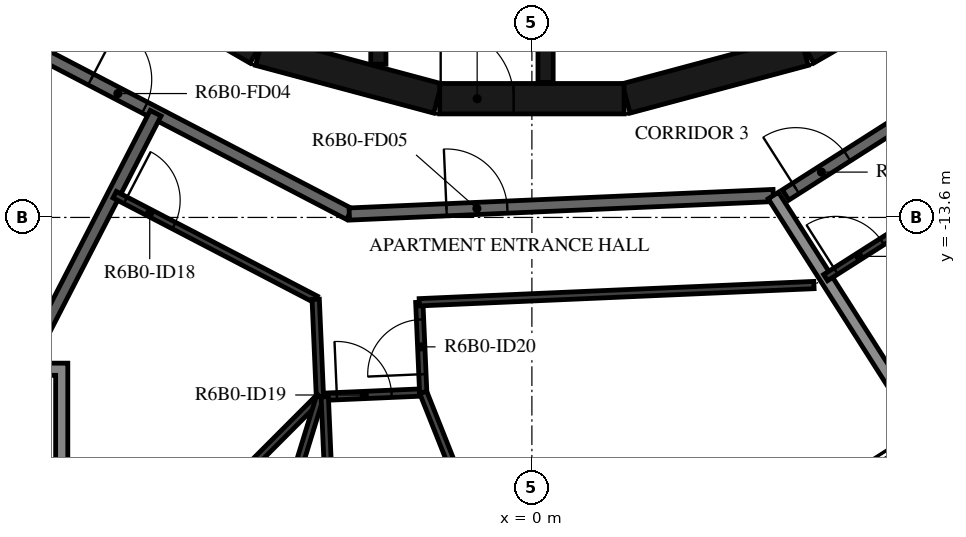
"""IFC4 building model, lengths in metres.
Left out: names, types, materials, properties, quantities, classifications, styles, units other than length and angle.
Written with IfcOpenShell. Run it as: python <this file> out.ifc"""

import sys

from ifc_helpers import new_model, si_unit, direction, frame, frame_2d, origin, place, context, subcontext, project, spatial, polyline, rectangle, outline, extrude, element, fill, save


model = new_model("IFC4")
c1 = context("Model", 3, precision=1e-05, world=origin(), true_north=direction((0.0, 1.0)))
c2 = subcontext(c1, "Body", "Model", "MODEL_VIEW")
j1 = project(units=[si_unit("LENGTHUNIT", "METRE"), si_unit("PLANEANGLEUNIT", "RADIAN")], contexts=[c1])
p1 = place(None, origin())
s1 = spatial("IfcSite", under=j1, at=p1, CompositionType="ELEMENT")
p2 = place(p1, origin())
s2 = spatial("IfcBuilding", under=s1, at=p2, CompositionType="ELEMENT")
p3 = place(p2, frame((0.0, 0.0, 240.7)))
s3 = spatial("IfcBuildingStorey", under=s2, at=p3, CompositionType="ELEMENT", Elevation=240.7)
p4 = place(p3, frame((1.55, -11.643, 0.0), z_axis=(0.0, 0.0, 1.0), x_axis=(0.965948410781, 0.258734743916, 0.0)))
e1 = element("IfcWall", 1, at=p4, inside=s3, PredefinedType="SHEAR", context=c2, shape_type="SweptSolid", body=[
    extrude(rectangle(XDim=3.033, YDim=0.5, at=frame_2d((1.516, 0.0))), origin(), (0.0, 0.0, 1.0), 3.12),
])
p5 = place(p3, frame((4.51, -10.845, 0.0), z_axis=(0.0, 0.0, 1.0), x_axis=(0.865975092491, 0.500087131594, 0.0)))
e2 = element("IfcWall", 2, at=p5, inside=s3, PredefinedType="SHEAR", context=c2, shape_type="SweptSolid", body=[
    extrude(rectangle(XDim=3.033, YDim=0.5, at=frame_2d((1.516, 0.0))), origin(), (0.0, 0.0, 1.0), 3.12),
])
p6 = place(p5, frame((1.066, 0.0, 0.0)))
e3 = element("IfcOpeningElement", 3, at=p6, cuts=e2, PredefinedType="OPENING", context=c2, shape_type="SweptSolid", body=[
    extrude(rectangle(XDim=0.9, YDim=2.1, at=frame_2d((0.45, 1.05))), frame((0.0, 0.26, 0.0), z_axis=(0.0, -1.0, 0.0), x_axis=(1.0, 0.0, 0.0)), (0.0, 0.0, 1.0), 0.52),
])
for number, where, z_axis, x_axis in (
    (4, (-7.137, -9.329, 0.0), (0.0, 0.0, 1.0), (0.866, -0.5, 0.0)),
    (5, (-4.479, -10.858, 0.0), (0.0, 0.0, 1.0), (0.966, -0.259, 0.0)),
):
    element("IfcWall", number, at=place(p3, frame(where, z_axis=z_axis, x_axis=x_axis)), inside=s3, PredefinedType="SHEAR", context=c2, shape_type="SweptSolid", body=[
        extrude(rectangle(XDim=3.033, YDim=0.5, at=frame_2d((1.516, 0.0))), origin(), (0.0, 0.0, 1.0), 3.12),
    ])
p7 = place(p3, frame((-1.516, -11.647, 0.0), z_axis=(0.0, 0.0, 1.0), x_axis=(1.0, 0.0, 0.0)))
e6 = element("IfcWall", 6, at=p7, inside=s3, PredefinedType="SHEAR", context=c2, shape_type="SweptSolid", body=[
    extrude(rectangle(XDim=3.033, YDim=0.5, at=frame_2d((1.516, 0.0))), origin(), (0.0, 0.0, 1.0), 3.12),
])
p8 = place(p7, frame((0.016, 0.0, 0.0)))
e7 = element("IfcOpeningElement", 7, at=p8, cuts=e6, PredefinedType="OPENING", context=c2, shape_type="SweptSolid", body=[
    extrude(rectangle(XDim=1.2, YDim=2.1, at=frame_2d((0.6, 1.05))), frame((0.0, 0.26, 0.0), z_axis=(0.0, -1.0, 0.0), x_axis=(1.0, 0.0, 0.0)), (0.0, 0.0, 1.0), 0.52),
])
p9 = place(p3, frame((-2.525, -8.97, 0.0), z_axis=(0.0, 0.0, 1.0), x_axis=(0.0, -1.0, 0.0)))
e8 = element("IfcWall", 8, at=p9, inside=s3, PredefinedType="SHEAR", context=c2, shape_type="SweptSolid", body=[
    extrude(rectangle(XDim=2.11, YDim=0.25, at=frame_2d((1.055, 0.0))), origin(), (0.0, 0.0, 1.0), 3.12),
])
p10 = place(p3, frame((0.225, -8.97, 0.0), z_axis=(0.0, 0.0, 1.0), x_axis=(0.0, -1.0, 0.0)))
e9 = element("IfcWall", 9, at=p10, inside=s3, PredefinedType="SHEAR", context=c2, shape_type="SweptSolid", body=[
    extrude(rectangle(XDim=2.41, YDim=0.25, at=frame_2d((1.205, 0.0))), origin(), (0.0, 0.0, 1.0), 3.12),
])
p11 = place(p3, frame((-9.372, -10.228, 0.0), z_axis=(0.0, 0.0, 1.0), x_axis=(0.887005184532, -0.461759464021, 0.0)))
e10 = element("IfcWall", 10, at=p11, inside=s3, PredefinedType="STANDARD", context=c2, shape_type="SweptSolid", body=[
    extrude(rectangle(XDim=7.181, YDim=0.2, at=frame_2d((3.591, 0.0))), origin(), (0.0, 0.0, 1.0), 3.12),
])
p12 = place(p11, frame((2.391, 0.0, 0.0)))
e11 = element("IfcOpeningElement", 11, at=p12, cuts=e10, PredefinedType="OPENING", context=c2, shape_type="SweptSolid", body=[
    extrude(rectangle(XDim=1.0, YDim=2.1, at=frame_2d((0.5, 1.05))), frame((0.0, 0.11, 0.0), z_axis=(0.0, -1.0, 0.0), x_axis=(1.0, 0.0, 0.0)), (0.0, 0.0, 1.0), 0.22),
])
p13 = place(p3, frame((-3.003, -13.544, 0.0), z_axis=(0.0, 0.0, 1.0), x_axis=(0.999048221872, 0.043619380718, 0.0)))
e12 = element("IfcWall", 12, at=p13, inside=s3, PredefinedType="STANDARD", context=c2, shape_type="SweptSolid", body=[
    extrude(rectangle(XDim=6.979, YDim=0.2, at=frame_2d((3.49, 0.0))), origin(), (0.0, 0.0, 1.0), 3.12),
])
p14 = place(p13, frame((1.6, 0.0, 0.0)))
e13 = element("IfcOpeningElement", 13, at=p14, cuts=e12, PredefinedType="OPENING", context=c2, shape_type="SweptSolid", body=[
    extrude(rectangle(XDim=1.0, YDim=2.1, at=frame_2d((0.5, 1.05))), frame((0.0, 0.11, 0.0), z_axis=(0.0, -1.0, 0.0), x_axis=(1.0, 0.0, 0.0)), (0.0, 0.0, 1.0), 0.22),
])
p15 = place(p3, frame((4.172, -13.231, 0.0), z_axis=(0.0, 0.0, 1.0), x_axis=(0.843388394728, 0.537304397561, 0.0)))
e14 = element("IfcWall", 14, at=p15, inside=s3, PredefinedType="STANDARD", context=c2, shape_type="SweptSolid", body=[
    extrude(rectangle(XDim=7.181, YDim=0.2, at=frame_2d((3.59, 0.0))), origin(), (0.0, 0.0, 1.0), 3.12),
])
p16 = place(p15, frame((0.2, 0.0, 0.0)))
e15 = element("IfcOpeningElement", 15, at=p16, cuts=e14, PredefinedType="OPENING", context=c2, shape_type="SweptSolid", body=[
    extrude(rectangle(XDim=1.0, YDim=2.1, at=frame_2d((0.5, 1.05))), frame((0.0, 0.11, 0.0), z_axis=(0.0, -1.0, 0.0), x_axis=(1.0, 0.0, 0.0)), (0.0, 0.0, 1.0), 0.22),
])
p17 = place(p3, frame((-8.303, -15.996, 0.0), z_axis=(0.0, 0.0, 1.0), x_axis=(0.457702371186, 0.889105471477, 0.0)))
e16 = element("IfcWall", 16, at=p17, inside=s3, PredefinedType="STANDARD", context=c2, shape_type="SweptSolid", body=[
    extrude(rectangle(XDim=4.623, YDim=0.2, at=frame_2d((2.312, 0.0))), origin(), (0.0, 0.0, 1.0), 3.12),
])
p18 = place(p3, frame((6.407, -17.064, 0.0), z_axis=(0.0, 0.0, 1.0), x_axis=(-0.537324777979, 0.843375410461, 0.0)))
e17 = element("IfcWall", 17, at=p18, inside=s3, PredefinedType="STANDARD", context=c2, shape_type="SweptSolid", body=[
    extrude(rectangle(XDim=4.535, YDim=0.2, at=frame_2d((2.268, 0.0))), origin(), (0.0, 0.0, 1.0), 2.73),
])
p19 = place(p3, frame((-6.861, -13.226, 0.0), z_axis=(0.0, 0.0, 1.0), x_axis=(0.887010791097, -0.461748694073, 0.0)))
e18 = element("IfcWall", 18, at=p19, inside=s3, PredefinedType="PARTITIONING", context=c2, shape_type="SweptSolid", body=[
    extrude(rectangle(XDim=3.727, YDim=0.12, at=frame_2d((1.864, 0.0))), origin(), (0.0, 0.0, 1.0), 3.12),
])
p20 = place(p19, frame((0.2, 0.0, 0.0)))
e19 = element("IfcOpeningElement", 19, at=p20, cuts=e18, PredefinedType="OPENING", context=c2, shape_type="SweptSolid", body=[
    extrude(rectangle(XDim=0.9, YDim=2.1, at=frame_2d((0.45, 1.05))), frame((0.0, 0.07, 0.0), z_axis=(0.0, -1.0, 0.0), x_axis=(1.0, 0.0, 0.0)), (0.0, 0.0, 1.0), 0.14),
])
p21 = place(p3, frame((-3.555, -14.947, 0.0), z_axis=(0.0, 0.0, 1.0), x_axis=(0.043470204022, -0.999054723908, 0.0)))
e20 = element("IfcWall", 20, at=p21, inside=s3, PredefinedType="PARTITIONING", context=c2, shape_type="SweptSolid", body=[
    extrude(rectangle(XDim=1.606, YDim=0.12, at=frame_2d((0.803, 0.0))), origin(), (0.0, 0.0, 1.0), 3.12),
])
p22 = place(p3, frame((-3.407, -16.548, 0.0), z_axis=(0.0, 0.0, 1.0), x_axis=(0.999045901572, 0.043672491929, 0.0)))
e21 = element("IfcWall", 21, at=p22, inside=s3, PredefinedType="PARTITIONING", context=c2, shape_type="SweptSolid", body=[
    extrude(rectangle(XDim=1.621, YDim=0.12, at=frame_2d((0.811, 0.0))), origin(), (0.0, 0.0, 1.0), 3.12),
])
p23 = place(p22, frame((0.2, 0.0, 0.0)))
e22 = element("IfcOpeningElement", 22, at=p23, cuts=e21, PredefinedType="OPENING", context=c2, shape_type="SweptSolid", body=[
    extrude(rectangle(XDim=0.9, YDim=2.1, at=frame_2d((0.45, 1.05))), frame((0.0, 0.07, 0.0), z_axis=(0.0, -1.0, 0.0), x_axis=(1.0, 0.0, 0.0)), (0.0, 0.0, 1.0), 0.14),
])
p24 = place(p3, frame((-1.787, -16.478, 0.0), z_axis=(0.0, 0.0, 1.0), x_axis=(-0.043601447011, 0.999049004713, 0.0)))
e23 = element("IfcWall", 23, at=p24, inside=s3, PredefinedType="PARTITIONING", context=c2, shape_type="SweptSolid", body=[
    extrude(rectangle(XDim=1.484, YDim=0.12, at=frame_2d((0.742, 0.0))), origin(), (0.0, 0.0, 1.0), 3.12),
])
p25 = place(p24, frame((0.3, 0.0, 0.0)))
e24 = element("IfcOpeningElement", 24, at=p25, cuts=e23, PredefinedType="OPENING", context=c2, shape_type="SweptSolid", body=[
    extrude(rectangle(XDim=0.9, YDim=2.1, at=frame_2d((0.45, 1.05))), frame((0.0, 0.07, 0.0), z_axis=(0.0, -1.0, 0.0), x_axis=(1.0, 0.0, 0.0)), (0.0, 0.0, 1.0), 0.14),
])
p26 = place(p3, frame((-1.852, -14.995, 0.0), z_axis=(0.0, 0.0, 1.0), x_axis=(0.999047773092, 0.043629658249, 0.0)))
e25 = element("IfcWall", 25, at=p26, inside=s3, PredefinedType="PARTITIONING", context=c2, shape_type="SweptSolid", body=[
    extrude(rectangle(XDim=6.497, YDim=0.12, at=frame_2d((3.248, 0.0))), origin(), (0.0, 0.0, 1.0), 3.12),
])
p27 = place(p3, frame((-11.862, -24.94, 0.0), z_axis=(0.0, 0.0, 1.0), x_axis=(0.70663293894, 0.707580306117, 0.0)))
e26 = element("IfcWall", 26, at=p27, inside=s3, PredefinedType="PARTITIONING", context=c2, shape_type="SweptSolid", body=[
    extrude(rectangle(XDim=11.854, YDim=0.12, at=frame_2d((5.927, 0.0))), origin(), (0.0, 0.0, 1.0), 3.12),
])
p28 = place(p27, frame((1.9, 0.0, 0.0)))
e27 = element("IfcOpeningElement", 27, at=p28, cuts=e26, PredefinedType="OPENING", context=c2, shape_type="SweptSolid", body=[
    extrude(rectangle(XDim=0.9, YDim=2.1, at=frame_2d((0.45, 1.05))), frame((0.0, 0.07, 0.0), z_axis=(0.0, -1.0, 0.0), x_axis=(1.0, 0.0, 0.0)), (0.0, 0.0, 1.0), 0.14),
])
p29 = place(p3, frame((-6.026, -24.795, 0.0), z_axis=(0.0, 0.0, 1.0), x_axis=(0.294501505058, 0.955651015548, 0.0)))
e28 = element("IfcWall", 28, at=p29, inside=s3, PredefinedType="PARTITIONING", context=c2, shape_type="SweptSolid", body=[
    extrude(rectangle(XDim=8.626, YDim=0.12, at=frame_2d((4.313, 0.0))), origin(), (0.0, 0.0, 1.0), 3.12),
])
p30 = place(p29, frame((0.7, 0.0, 0.0)))
e29 = element("IfcOpeningElement", 29, at=p30, cuts=e28, PredefinedType="OPENING", context=c2, shape_type="SweptSolid", body=[
    extrude(rectangle(XDim=0.8, YDim=2.1, at=frame_2d((0.4, 1.05))), frame((0.0, 0.07, 0.0), z_axis=(0.0, -1.0, 0.0), x_axis=(1.0, 0.0, 0.0)), (0.0, 0.0, 1.0), 0.14),
])
p31 = place(p3, frame((-3.119, -23.133, 0.0), z_axis=(0.0, 0.0, 1.0), x_axis=(-0.043633326708, 0.99904761288, 0.0)))
e30 = element("IfcWall", 30, at=p31, inside=s3, PredefinedType="PARTITIONING", context=c2, shape_type="SweptSolid", body=[
    extrude(rectangle(XDim=6.591, YDim=0.12, at=frame_2d((3.296, 0.0))), origin(), (0.0, 0.0, 1.0), 3.12),
])
p32 = place(p3, frame((0.056, -21.11, 0.0), z_axis=(0.0, 0.0, 1.0), x_axis=(-0.369701541807, 0.929150563679, 0.0)))
e31 = element("IfcWall", 31, at=p32, inside=s3, PredefinedType="PARTITIONING", context=c2, shape_type="SweptSolid", body=[
    extrude(rectangle(XDim=4.986, YDim=0.12, at=frame_2d((2.493, 0.0))), origin(), (0.0, 0.0, 1.0), 2.73),
])
p33 = place(p32, frame((0.2, 0.0, 0.0)))
e32 = element("IfcOpeningElement", 32, at=p33, cuts=e31, PredefinedType="OPENING", context=c2, shape_type="SweptSolid", body=[
    extrude(rectangle(XDim=0.9, YDim=2.1, at=frame_2d((0.45, 1.05))), frame((0.0, 0.07, 0.0), z_axis=(0.0, -1.0, 0.0), x_axis=(1.0, 0.0, 0.0)), (0.0, 0.0, 1.0), 0.14),
])
p34 = place(p3, frame((4.83, -14.59, 0.0), z_axis=(0.0, 0.0, 1.0), x_axis=(0.843395898817, 0.537292618467, 0.0)))
e33 = element("IfcWall", 33, at=p34, inside=s3, PredefinedType="PARTITIONING", context=c2, shape_type="SweptSolid", body=[
    extrude(rectangle(XDim=1.59, YDim=0.12, at=frame_2d((0.795, 0.0))), origin(), (0.0, 0.0, 1.0), 3.12),
])
p35 = place(p34, frame((0.2, 0.0, 0.0)))
e34 = element("IfcOpeningElement", 34, at=p35, cuts=e33, PredefinedType="OPENING", context=c2, shape_type="SweptSolid", body=[
    extrude(rectangle(XDim=0.9, YDim=2.1, at=frame_2d((0.45, 1.05))), frame((0.0, 0.07, 0.0), z_axis=(0.0, -1.0, 0.0), x_axis=(1.0, 0.0, 0.0)), (0.0, 0.0, 1.0), 0.14),
])
p36 = place(p3, origin())
e35 = element("IfcWall", 35, at=p36, inside=s3, PredefinedType="STANDARD", context=c2, shape_type="SweptSolid", body=[
    extrude(outline(polyline([(-7.632, -15.996), (-7.632, -18.896), (-10.532, -18.896), (-10.532, -15.996), (-7.632, -15.996)]), holes=[polyline([(-10.332, -18.696), (-7.832, -18.696), (-7.832, -16.196), (-10.332, -16.196), (-10.332, -18.696)])]), origin(), (0.0, 0.0, 1.0), 3.12),
])
p37 = place(p8, origin())
e36 = element("IfcDoor", 36, at=p37, inside=s3, OperationType="SINGLE_SWING_RIGHT", PredefinedType="DOOR", context=c2, shape_type="SweptSolid", body=[
    extrude(rectangle(XDim=1.2, YDim=2.1, at=frame_2d((0.6, 1.05))), frame((0.0, 0.025, 0.0), z_axis=(0.0, -1.0, 0.0), x_axis=(1.0, 0.0, 0.0)), (0.0, 0.0, 1.0), 0.05),
])
fill(e7, e36)
p38 = place(p12, origin())
e37 = element("IfcDoor", 37, at=p38, inside=s3, OperationType="SINGLE_SWING_RIGHT", PredefinedType="DOOR", context=c2, shape_type="SweptSolid", body=[
    extrude(rectangle(XDim=1.0, YDim=2.1, at=frame_2d((0.5, 1.05))), frame((0.0, 0.025, 0.0), z_axis=(0.0, -1.0, 0.0), x_axis=(1.0, 0.0, 0.0)), (0.0, 0.0, 1.0), 0.05),
])
fill(e11, e37)
p39 = place(p14, origin())
e38 = element("IfcDoor", 38, at=p39, inside=s3, OperationType="SINGLE_SWING_LEFT", PredefinedType="DOOR", context=c2, shape_type="SweptSolid", body=[
    extrude(rectangle(XDim=1.0, YDim=2.1, at=frame_2d((0.5, 1.05))), frame((0.0, 0.025, 0.0), z_axis=(0.0, -1.0, 0.0), x_axis=(1.0, 0.0, 0.0)), (0.0, 0.0, 1.0), 0.05),
])
fill(e13, e38)
p40 = place(p20, origin())
e39 = element("IfcDoor", 39, at=p40, inside=s3, OperationType="SINGLE_SWING_LEFT", PredefinedType="DOOR", context=c2, shape_type="SweptSolid", body=[
    extrude(rectangle(XDim=0.9, YDim=2.1, at=frame_2d((0.45, 1.05))), frame((0.0, 0.025, 0.0), z_axis=(0.0, -1.0, 0.0), x_axis=(1.0, 0.0, 0.0)), (0.0, 0.0, 1.0), 0.05),
])
fill(e19, e39)
p41 = place(p23, origin())
e40 = element("IfcDoor", 40, at=p41, inside=s3, OperationType="SINGLE_SWING_LEFT", PredefinedType="DOOR", context=c2, shape_type="SweptSolid", body=[
    extrude(rectangle(XDim=0.9, YDim=2.1, at=frame_2d((0.45, 1.05))), frame((0.0, 0.025, 0.0), z_axis=(0.0, -1.0, 0.0), x_axis=(1.0, 0.0, 0.0)), (0.0, 0.0, 1.0), 0.05),
])
fill(e22, e40)
p42 = place(p25, origin())
e41 = element("IfcDoor", 41, at=p42, inside=s3, OperationType="SINGLE_SWING_LEFT", PredefinedType="DOOR", context=c2, shape_type="SweptSolid", body=[
    extrude(rectangle(XDim=0.9, YDim=2.1, at=frame_2d((0.45, 1.05))), frame((0.0, 0.025, 0.0), z_axis=(0.0, -1.0, 0.0), x_axis=(1.0, 0.0, 0.0)), (0.0, 0.0, 1.0), 0.05),
])
fill(e24, e41)
p43 = place(p16, origin())
e42 = element("IfcDoor", 42, at=p43, inside=s3, OperationType="SINGLE_SWING_LEFT", PredefinedType="DOOR", context=c2, shape_type="SweptSolid", body=[
    extrude(rectangle(XDim=1.0, YDim=2.1, at=frame_2d((0.5, 1.05))), frame((0.0, 0.025, 0.0), z_axis=(0.0, -1.0, 0.0), x_axis=(1.0, 0.0, 0.0)), (0.0, 0.0, 1.0), 0.05),
])
fill(e15, e42)
p44 = place(p35, origin())
e43 = element("IfcDoor", 43, at=p44, inside=s3, OperationType="SINGLE_SWING_LEFT", PredefinedType="DOOR", context=c2, shape_type="SweptSolid", body=[
    extrude(rectangle(XDim=0.9, YDim=2.1, at=frame_2d((0.45, 1.05))), frame((0.0, 0.025, 0.0), z_axis=(0.0, -1.0, 0.0), x_axis=(1.0, 0.0, 0.0)), (0.0, 0.0, 1.0), 0.05),
])
fill(e34, e43)
save(model, sys.argv[1])
